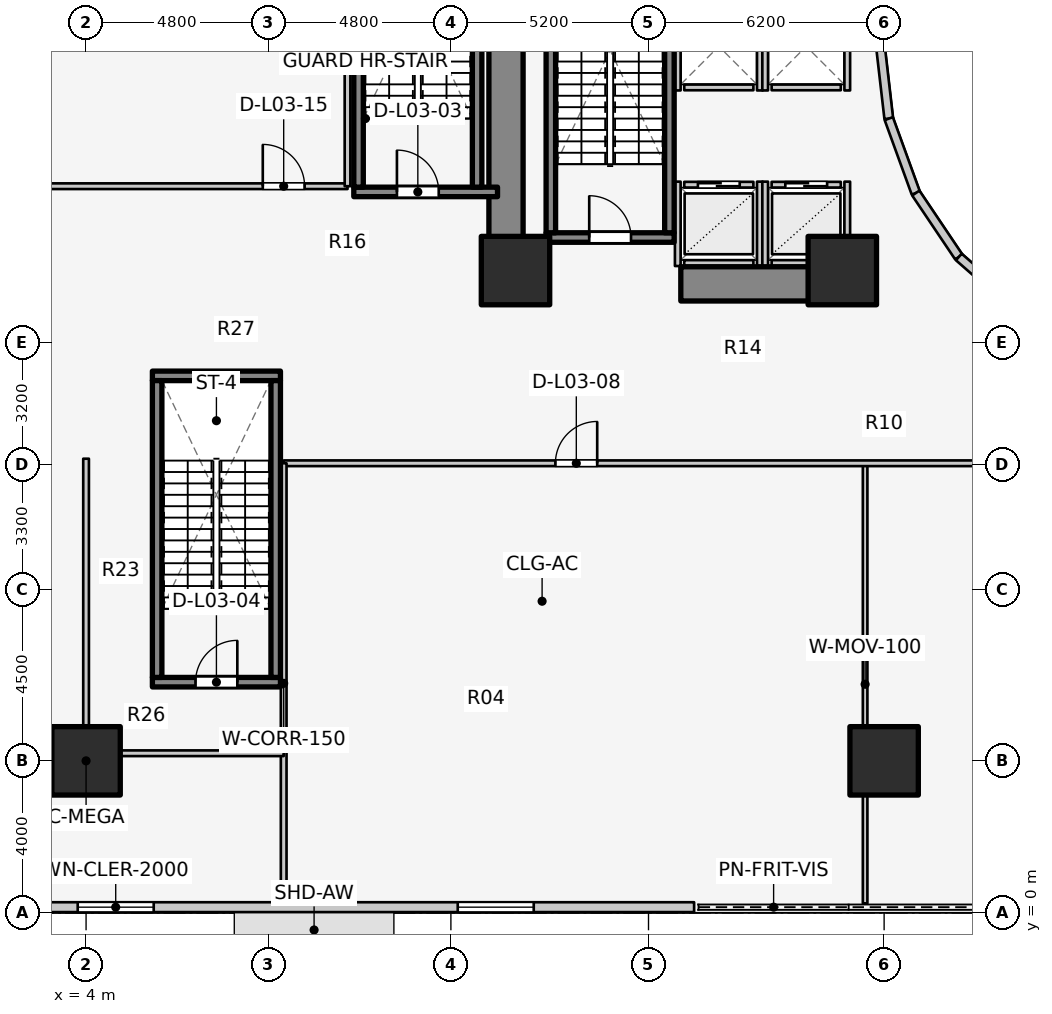
"""IFC4 building model, lengths in metres.
Left out: names, types, materials, properties, quantities, classifications, styles, units other than length and angle.
Written with IfcOpenShell. Run it as: python <this file> out.ifc"""

import sys

from ifc_helpers import new_model, si_unit, direction, frame, frame_2d, origin, origin_2d, place, context, subcontext, project, spatial, rectangle, extrude, element, fill, save


model = new_model("IFC4")
c1 = context("Model", 3, precision=1e-05, world=origin(), true_north=direction((0.0, 1.0)))
c2 = subcontext(c1, "Body", "Model", "MODEL_VIEW")
j1 = project(units=[si_unit("LENGTHUNIT", "METRE"), si_unit("PLANEANGLEUNIT", "RADIAN")], contexts=[c1])
p1 = place(None, origin())
s1 = spatial("IfcSite", under=j1, at=p1, CompositionType="ELEMENT")
p2 = place(p1, origin())
s2 = spatial("IfcBuilding", under=s1, at=p2, CompositionType="ELEMENT")
p3 = place(p2, frame((0.0, 0.0, 9.2)))
s3 = spatial("IfcBuildingStorey", under=s2, at=p3, CompositionType="ELEMENT", Elevation=9.2)
p4 = place(p3, frame((15.05, 17.05, 0.0), z_axis=(0.0, 0.0, 1.0), x_axis=(0.0, 1.0, 0.0)))
e1 = element("IfcWall", 1, at=p4, inside=s3, PredefinedType="SHEAR", context=c2, shape_type="SweptSolid", body=[
    extrude(rectangle(XDim=12.8, YDim=0.9, at=frame_2d((6.4, 0.0))), origin(), (0.0, 0.0, 1.0), 4.6),
])
p5 = place(p3, frame((19.65, 16.55, 0.0), z_axis=(0.0, 0.0, 1.0), x_axis=(1.0, 0.0, 0.0)))
e2 = element("IfcWall", 2, at=p5, inside=s3, PredefinedType="SHEAR", context=c2, shape_type="SweptSolid", body=[
    extrude(rectangle(XDim=4.5, YDim=0.9, at=frame_2d((2.25, 0.0))), origin(), (0.0, 0.0, 1.0), 4.6),
])
p6 = place(p3, frame((16.105, 17.77, 0.0), z_axis=(0.0, 0.0, 1.0), x_axis=(1.0, 0.0, 0.0)))
e3 = element("IfcWall", 3, at=p6, inside=s3, PredefinedType="SOLIDWALL", context=c2, shape_type="SweptSolid", body=[
    extrude(rectangle(XDim=3.37, YDim=0.25, at=frame_2d((1.685, 0.0))), origin(), (0.0, 0.0, 1.0), 4.6),
])
p7 = place(p6, frame((1.135, 0.0, 0.0)))
e4 = element("IfcOpeningElement", 4, at=p7, cuts=e3, PredefinedType="OPENING", context=c2, shape_type="SweptSolid", body=[
    extrude(rectangle(XDim=1.1, YDim=2.1, at=frame_2d((0.55, 1.05))), frame((0.0, 0.135, 0.0), z_axis=(0.0, -1.0, 0.0), x_axis=(1.0, 0.0, 0.0)), (0.0, 0.0, 1.0), 0.27),
])
for number, where, z_axis, x_axis in (
    (5, (16.23, 17.895, 0.0), (0.0, 0.0, 1.0), (0.0, 1.0, 0.0)),
    (6, (19.35, 17.895, 0.0), (0.0, 0.0, 1.0), (0.0, 1.0, 0.0)),
):
    element("IfcWall", number, at=place(p3, frame(where, z_axis=z_axis, x_axis=x_axis)), inside=s3, PredefinedType="SOLIDWALL", context=c2, shape_type="SweptSolid", body=[
        extrude(rectangle(XDim=7.81, YDim=0.25, at=frame_2d((3.905, 0.0))), origin(), (0.0, 0.0, 1.0), 4.6),
    ])
p8 = place(p3, frame((11.045, 18.97, 0.0), z_axis=(0.0, 0.0, 1.0), x_axis=(1.0, 0.0, 0.0)))
e7 = element("IfcWall", 7, at=p8, inside=s3, PredefinedType="SOLIDWALL", context=c2, shape_type="SweptSolid", body=[
    extrude(rectangle(XDim=3.782, YDim=0.25, at=frame_2d((1.891, 0.0))), origin(), (0.0, 0.0, 1.0), 4.6),
])
p9 = place(p8, frame((1.135, 0.0, 0.0)))
e8 = element("IfcOpeningElement", 8, at=p9, cuts=e7, PredefinedType="OPENING", context=c2, shape_type="SweptSolid", body=[
    extrude(rectangle(XDim=1.1, YDim=2.1, at=frame_2d((0.55, 1.05))), frame((0.0, 0.135, 0.0), z_axis=(0.0, -1.0, 0.0), x_axis=(1.0, 0.0, 0.0)), (0.0, 0.0, 1.0), 0.27),
])
for number, where, z_axis, x_axis in (
    (9, (11.17, 19.095, 0.0), (0.0, 0.0, 1.0), (0.0, 1.0, 0.0)),
    (10, (14.29, 19.095, 0.0), (0.0, 0.0, 1.0), (0.0, 1.0, 0.0)),
):
    element("IfcWall", number, at=place(p3, frame(where, z_axis=z_axis, x_axis=x_axis)), inside=s3, PredefinedType="SOLIDWALL", context=c2, shape_type="SweptSolid", body=[
        extrude(rectangle(XDim=7.81, YDim=0.25, at=frame_2d((3.905, 0.0))), origin(), (0.0, 0.0, 1.0), 4.6),
    ])
p10 = place(p3, frame((5.745, 6.07, 0.0), z_axis=(0.0, 0.0, 1.0), x_axis=(1.0, 0.0, 0.0)))
e11 = element("IfcWall", 11, at=p10, inside=s3, PredefinedType="SOLIDWALL", context=c2, shape_type="SweptSolid", body=[
    extrude(rectangle(XDim=3.37, YDim=0.25, at=frame_2d((1.685, 0.0))), origin(), (0.0, 0.0, 1.0), 4.6),
])
p11 = place(p10, frame((1.135, 0.0, 0.0)))
e12 = element("IfcOpeningElement", 12, at=p11, cuts=e11, PredefinedType="OPENING", context=c2, shape_type="SweptSolid", body=[
    extrude(rectangle(XDim=1.1, YDim=2.1, at=frame_2d((0.55, 1.05))), frame((0.0, 0.135, 0.0), z_axis=(0.0, -1.0, 0.0), x_axis=(1.0, 0.0, 0.0)), (0.0, 0.0, 1.0), 0.27),
])
p12 = place(p3, frame((5.745, 14.13, 0.0), z_axis=(0.0, 0.0, 1.0), x_axis=(1.0, 0.0, 0.0)))
e13 = element("IfcWall", 13, at=p12, inside=s3, PredefinedType="SOLIDWALL", context=c2, shape_type="SweptSolid", body=[
    extrude(rectangle(XDim=3.37, YDim=0.25, at=frame_2d((1.685, 0.0))), origin(), (0.0, 0.0, 1.0), 4.6),
])
for number, where, z_axis, x_axis in (
    (14, (5.87, 6.195, 0.0), (0.0, 0.0, 1.0), (0.0, 1.0, 0.0)),
    (15, (8.99, 6.195, 0.0), (0.0, 0.0, 1.0), (0.0, 1.0, 0.0)),
):
    element("IfcWall", number, at=place(p3, frame(where, z_axis=z_axis, x_axis=x_axis)), inside=s3, PredefinedType="SOLIDWALL", context=c2, shape_type="SweptSolid", body=[
        extrude(rectangle(XDim=7.81, YDim=0.25, at=frame_2d((3.905, 0.0))), origin(), (0.0, 0.0, 1.0), 4.6),
    ])
for number, where, z_axis, x_axis in (
    (16, (15.3, 16.9, 0.0), (0.0, 0.0, 1.0), (1.0, 0.0, 0.0)),
    (17, (23.9, 16.9, 0.0), (0.0, 0.0, 1.0), (1.0, 0.0, 0.0)),
    (18, (4.0, 4.0, 0.0), (0.0, 0.0, 1.0), (1.0, 0.0, 0.0)),
    (19, (25.0, 4.0, 0.0), (0.0, 0.0, 1.0), (1.0, 0.0, 0.0)),
):
    element("IfcColumn", number, at=place(p3, frame(where, z_axis=z_axis, x_axis=x_axis)), inside=s3, PredefinedType="COLUMN", context=c2, shape_type="SweptSolid", body=[
        extrude(rectangle(XDim=1.8, YDim=1.8, at=origin_2d()), origin(), (0.0, 0.0, 1.0), 4.6),
    ])
p13 = place(p3, frame((0.28, 0.15, 0.0), z_axis=(0.0, 0.0, 1.0), x_axis=(1.0, 0.0, 0.0)))
e20 = element("IfcWall", 20, at=p13, inside=s3, PredefinedType="STANDARD", context=c2, shape_type="SweptSolid", body=[
    extrude(rectangle(XDim=19.72, YDim=0.26, at=frame_2d((9.86, 0.0))), origin(), (0.0, 0.0, 1.0), 4.28),
])
p14 = place(p13, frame((3.5, 0.0, 2.2)))
e21 = element("IfcOpeningElement", 21, at=p14, cuts=e20, PredefinedType="OPENING", context=c2, shape_type="SweptSolid", body=[
    extrude(rectangle(XDim=2.0, YDim=1.1, at=frame_2d((1.0, 0.55))), frame((0.0, 0.14, 0.0), z_axis=(0.0, -1.0, 0.0), x_axis=(1.0, 0.0, 0.0)), (0.0, 0.0, 1.0), 0.28),
])
p15 = place(p13, frame((13.5, 0.0, 2.2)))
e22 = element("IfcOpeningElement", 22, at=p15, cuts=e20, PredefinedType="OPENING", context=c2, shape_type="SweptSolid", body=[
    extrude(rectangle(XDim=2.0, YDim=1.1, at=frame_2d((1.0, 0.55))), frame((0.0, 0.14, 0.0), z_axis=(0.0, -1.0, 0.0), x_axis=(1.0, 0.0, 0.0)), (0.0, 0.0, 1.0), 0.28),
])
p16 = place(p3, frame((24.88, 23.0, 0.0), z_axis=(0.0, 0.0, 1.0), x_axis=(0.114711713601, -0.993398823617, 0.0)))
e23 = element("IfcWall", 23, at=p16, inside=s3, PredefinedType="STANDARD", context=c2, shape_type="SweptSolid", body=[
    extrude(rectangle(XDim=2.115, YDim=0.23, at=frame_2d((1.058, 0.0))), origin(), (0.0, 0.0, 1.0), 3.28),
])
p17 = place(p3, frame((25.123, 20.898, 0.0), z_axis=(0.0, 0.0, 1.0), x_axis=(0.341423187295, -0.93990968033, 0.0)))
e24 = element("IfcWall", 24, at=p17, inside=s3, PredefinedType="STANDARD", context=c2, shape_type="SweptSolid", body=[
    extrude(rectangle(XDim=2.084, YDim=0.23, at=frame_2d((1.042, 0.0))), origin(), (0.0, 0.0, 1.0), 3.28),
])
p18 = place(p3, frame((25.834, 18.94, 0.0), z_axis=(0.0, 0.0, 1.0), x_axis=(0.558197800898, -0.829707909492, 0.0)))
e25 = element("IfcWall", 25, at=p18, inside=s3, PredefinedType="STANDARD", context=c2, shape_type="SweptSolid", body=[
    extrude(rectangle(XDim=2.027, YDim=0.23, at=frame_2d((1.013, 0.0))), origin(), (0.0, 0.0, 1.0), 3.28),
])
p19 = place(p3, frame((26.965, 17.258, 0.0), z_axis=(0.0, 0.0, 1.0), x_axis=(0.752576694707, -0.658504607869, 0.0)))
e26 = element("IfcWall", 26, at=p19, inside=s3, PredefinedType="STANDARD", context=c2, shape_type="SweptSolid", body=[
    extrude(rectangle(XDim=1.959, YDim=0.23, at=frame_2d((0.98, 0.0))), origin(), (0.0, 0.0, 1.0), 3.28),
])
p20 = place(p3, frame((19.74, 19.16, 0.0), z_axis=(0.0, 0.0, 1.0), x_axis=(1.0, 0.0, 0.0)))
e27 = element("IfcWall", 27, at=p20, inside=s3, PredefinedType="SOLIDWALL", context=c2, shape_type="SweptSolid", body=[
    extrude(rectangle(XDim=1.82, YDim=0.15, at=frame_2d((0.91, 0.0))), origin(), (0.0, 0.0, 1.0), 4.255),
])
p21 = place(p20, frame((0.36, 0.0, 0.0)))
e28 = element("IfcOpeningElement", 28, at=p21, cuts=e27, PredefinedType="OPENING", context=c2, shape_type="SweptSolid", body=[
    extrude(rectangle(XDim=1.1, YDim=2.1, at=frame_2d((0.55, 1.05))), frame((0.0, 0.085, 0.0), z_axis=(0.0, -1.0, 0.0), x_axis=(1.0, 0.0, 0.0)), (0.0, 0.0, 1.0), 0.17),
])
p22 = place(p3, frame((19.74, 17.1, 0.0), z_axis=(0.0, 0.0, 1.0), x_axis=(1.0, 0.0, 0.0)))
e29 = element("IfcWall", 29, at=p22, inside=s3, PredefinedType="SOLIDWALL", context=c2, shape_type="SweptSolid", body=[
    extrude(rectangle(XDim=1.82, YDim=0.15, at=frame_2d((0.91, 0.0))), origin(), (0.0, 0.0, 1.0), 4.255),
])
p23 = place(p3, frame((19.57, 17.02, 0.0), z_axis=(0.0, 0.0, 1.0), x_axis=(0.0, 1.0, 0.0)))
e30 = element("IfcWall", 30, at=p23, inside=s3, PredefinedType="SOLIDWALL", context=c2, shape_type="SweptSolid", body=[
    extrude(rectangle(XDim=2.22, YDim=0.15, at=frame_2d((1.11, 0.0))), origin(), (0.0, 0.0, 1.0), 3.62),
])
p24 = place(p3, frame((21.73, 17.02, 0.0), z_axis=(0.0, 0.0, 1.0), x_axis=(0.0, 1.0, 0.0)))
e31 = element("IfcWall", 31, at=p24, inside=s3, PredefinedType="SOLIDWALL", context=c2, shape_type="SweptSolid", body=[
    extrude(rectangle(XDim=2.22, YDim=0.15, at=frame_2d((1.11, 0.0))), origin(), (0.0, 0.0, 1.0), 4.255),
])
p25 = place(p3, frame((22.04, 19.16, 0.0), z_axis=(0.0, 0.0, 1.0), x_axis=(1.0, 0.0, 0.0)))
e32 = element("IfcWall", 32, at=p25, inside=s3, PredefinedType="SOLIDWALL", context=c2, shape_type="SweptSolid", body=[
    extrude(rectangle(XDim=1.82, YDim=0.15, at=frame_2d((0.91, 0.0))), origin(), (0.0, 0.0, 1.0), 3.62),
])
p26 = place(p25, frame((0.36, 0.0, 0.0)))
e33 = element("IfcOpeningElement", 33, at=p26, cuts=e32, PredefinedType="OPENING", context=c2, shape_type="SweptSolid", body=[
    extrude(rectangle(XDim=1.1, YDim=2.1, at=frame_2d((0.55, 1.05))), frame((0.0, 0.085, 0.0), z_axis=(0.0, -1.0, 0.0), x_axis=(1.0, 0.0, 0.0)), (0.0, 0.0, 1.0), 0.17),
])
p27 = place(p3, frame((22.04, 17.1, 0.0), z_axis=(0.0, 0.0, 1.0), x_axis=(1.0, 0.0, 0.0)))
e34 = element("IfcWall", 34, at=p27, inside=s3, PredefinedType="SOLIDWALL", context=c2, shape_type="SweptSolid", body=[
    extrude(rectangle(XDim=1.82, YDim=0.15, at=frame_2d((0.91, 0.0))), origin(), (0.0, 0.0, 1.0), 3.62),
])
p28 = place(p3, frame((21.87, 17.02, 0.0), z_axis=(0.0, 0.0, 1.0), x_axis=(0.0, 1.0, 0.0)))
e35 = element("IfcWall", 35, at=p28, inside=s3, PredefinedType="SOLIDWALL", context=c2, shape_type="SweptSolid", body=[
    extrude(rectangle(XDim=2.22, YDim=0.15, at=frame_2d((1.11, 0.0))), origin(), (0.0, 0.0, 1.0), 4.255),
])
p29 = place(p3, frame((24.03, 17.02, 0.0), z_axis=(0.0, 0.0, 1.0), x_axis=(0.0, 1.0, 0.0)))
e36 = element("IfcWall", 36, at=p29, inside=s3, PredefinedType="SOLIDWALL", context=c2, shape_type="SweptSolid", body=[
    extrude(rectangle(XDim=2.22, YDim=0.15, at=frame_2d((1.11, 0.0))), origin(), (0.0, 0.0, 1.0), 3.3),
])
p30 = place(p3, frame((19.74, 21.72, 0.0), z_axis=(0.0, 0.0, 1.0), x_axis=(1.0, 0.0, 0.0)))
e37 = element("IfcWall", 37, at=p30, inside=s3, PredefinedType="SOLIDWALL", context=c2, shape_type="SweptSolid", body=[
    extrude(rectangle(XDim=1.82, YDim=0.15, at=frame_2d((0.91, 0.0))), origin(), (0.0, 0.0, 1.0), 4.255),
])
for number, where, z_axis, x_axis in (
    (38, (19.57, 21.64, 0.0), (0.0, 0.0, 1.0), (0.0, 1.0, 0.0)),
    (39, (21.73, 21.64, 0.0), (0.0, 0.0, 1.0), (0.0, 1.0, 0.0)),
):
    element("IfcWall", number, at=place(p3, frame(where, z_axis=z_axis, x_axis=x_axis)), inside=s3, PredefinedType="SOLIDWALL", context=c2, shape_type="SweptSolid", body=[
        extrude(rectangle(XDim=2.32, YDim=0.15, at=frame_2d((1.16, 0.0))), origin(), (0.0, 0.0, 1.0), 4.255),
    ])
p31 = place(p3, frame((22.04, 21.72, 0.0), z_axis=(0.0, 0.0, 1.0), x_axis=(1.0, 0.0, 0.0)))
e40 = element("IfcWall", 40, at=p31, inside=s3, PredefinedType="SOLIDWALL", context=c2, shape_type="SweptSolid", body=[
    extrude(rectangle(XDim=1.82, YDim=0.15, at=frame_2d((0.91, 0.0))), origin(), (0.0, 0.0, 1.0), 3.62),
])
p32 = place(p3, frame((21.87, 21.64, 0.0), z_axis=(0.0, 0.0, 1.0), x_axis=(0.0, 1.0, 0.0)))
e41 = element("IfcWall", 41, at=p32, inside=s3, PredefinedType="SOLIDWALL", context=c2, shape_type="SweptSolid", body=[
    extrude(rectangle(XDim=2.32, YDim=0.15, at=frame_2d((1.16, 0.0))), origin(), (0.0, 0.0, 1.0), 4.255),
])
p33 = place(p3, frame((24.03, 21.64, 0.0), z_axis=(0.0, 0.0, 1.0), x_axis=(0.0, 1.0, 0.0)))
e42 = element("IfcWall", 42, at=p33, inside=s3, PredefinedType="SOLIDWALL", context=c2, shape_type="SweptSolid", body=[
    extrude(rectangle(XDim=2.32, YDim=0.15, at=frame_2d((1.16, 0.0))), origin(), (0.0, 0.0, 1.0), 3.62),
])
p34 = place(p3, frame((24.5, 0.25, 0.0), z_axis=(0.0, 0.0, 1.0), x_axis=(0.0, 1.0, 0.0)))
e43 = element("IfcWall", 43, at=p34, inside=s3, PredefinedType="MOVABLE", context=c2, shape_type="SweptSolid", body=[
    extrude(rectangle(XDim=11.53, YDim=0.12, at=frame_2d((5.765, 0.0))), origin(), (0.0, 0.0, 1.0), 3.3),
])
p35 = place(p3, frame((9.2, 11.83, 0.0), z_axis=(0.0, 0.0, 1.0), x_axis=(1.0, 0.0, 0.0)))
e44 = element("IfcWall", 44, at=p35, inside=s3, PredefinedType="PARTITIONING", context=c2, shape_type="SweptSolid", body=[
    extrude(rectangle(XDim=45.6, YDim=0.15, at=frame_2d((22.8, 0.0))), origin(), (0.0, 0.0, 1.0), 3.3),
])
p36 = place(p35, frame((7.15, 0.0, 0.0)))
e45 = element("IfcOpeningElement", 45, at=p36, cuts=e44, PredefinedType="OPENING", context=c2, shape_type="SweptSolid", body=[
    extrude(rectangle(XDim=1.1, YDim=2.1, at=frame_2d((0.55, 1.05))), frame((0.0, 0.085, 0.0), z_axis=(0.0, -1.0, 0.0), x_axis=(1.0, 0.0, 0.0)), (0.0, 0.0, 1.0), 0.17),
])
p37 = place(p35, frame((23.35, 0.0, 0.0)))
e46 = element("IfcOpeningElement", 46, at=p37, cuts=e44, PredefinedType="OPENING", context=c2, shape_type="SweptSolid", body=[
    extrude(rectangle(XDim=1.1, YDim=2.1, at=frame_2d((0.55, 1.05))), frame((0.0, 0.085, 0.0), z_axis=(0.0, -1.0, 0.0), x_axis=(1.0, 0.0, 0.0)), (0.0, 0.0, 1.0), 0.17),
])
p38 = place(p35, frame((38.45, 0.0, 0.0)))
e47 = element("IfcOpeningElement", 47, at=p38, cuts=e44, PredefinedType="OPENING", context=c2, shape_type="SweptSolid", body=[
    extrude(rectangle(XDim=1.1, YDim=2.1, at=frame_2d((0.55, 1.05))), frame((0.0, 0.085, 0.0), z_axis=(0.0, -1.0, 0.0), x_axis=(1.0, 0.0, 0.0)), (0.0, 0.0, 1.0), 0.17),
])
p39 = place(p3, frame((9.2, 0.25, 0.0), z_axis=(0.0, 0.0, 1.0), x_axis=(0.0, 1.0, 0.0)))
e48 = element("IfcWall", 48, at=p39, inside=s3, PredefinedType="PARTITIONING", context=c2, shape_type="SweptSolid", body=[
    extrude(rectangle(XDim=11.58, YDim=0.15, at=frame_2d((5.79, 0.0))), origin(), (0.0, 0.0, 1.0), 3.3),
])
p40 = place(p3, frame((4.0, 4.2, 0.0), z_axis=(0.0, 0.0, 1.0), x_axis=(0.0, 1.0, 0.0)))
e49 = element("IfcWall", 49, at=p40, inside=s3, PredefinedType="PARTITIONING", context=c2, shape_type="SweptSolid", body=[
    extrude(rectangle(XDim=7.75, YDim=0.15, at=frame_2d((3.875, 0.0))), origin(), (0.0, 0.0, 1.0), 3.3),
])
p41 = place(p3, frame((4.0, 4.2, 0.0), z_axis=(0.0, 0.0, 1.0), x_axis=(1.0, 0.0, 0.0)))
e50 = element("IfcWall", 50, at=p41, inside=s3, PredefinedType="PARTITIONING", context=c2, shape_type="SweptSolid", body=[
    extrude(rectangle(XDim=5.2, YDim=0.15, at=frame_2d((2.6, 0.0))), origin(), (0.0, 0.0, 1.0), 3.3),
])
p42 = place(p3, frame((0.25, 19.12, 0.0), z_axis=(0.0, 0.0, 1.0), x_axis=(1.0, 0.0, 0.0)))
e51 = element("IfcWall", 51, at=p42, inside=s3, PredefinedType="PARTITIONING", context=c2, shape_type="SweptSolid", body=[
    extrude(rectangle(XDim=10.63, YDim=0.15, at=frame_2d((5.315, 0.0))), origin(), (0.0, 0.0, 1.0), 3.3),
])
p43 = place(p42, frame((8.4, 0.0, 0.0)))
e52 = element("IfcOpeningElement", 52, at=p43, cuts=e51, PredefinedType="OPENING", context=c2, shape_type="SweptSolid", body=[
    extrude(rectangle(XDim=1.1, YDim=2.1, at=frame_2d((0.55, 1.05))), frame((0.0, 0.085, 0.0), z_axis=(0.0, -1.0, 0.0), x_axis=(1.0, 0.0, 0.0)), (0.0, 0.0, 1.0), 0.17),
])
p44 = place(p3, frame((10.88, 19.12, 0.0), z_axis=(0.0, 0.0, 1.0), x_axis=(0.0, 1.0, 0.0)))
e53 = element("IfcWall", 53, at=p44, inside=s3, PredefinedType="PARTITIONING", context=c2, shape_type="SweptSolid", body=[
    extrude(rectangle(XDim=11.08, YDim=0.15, at=frame_2d((5.54, 0.0))), origin(), (0.0, 0.0, 1.0), 3.62),
])
p45 = place(p14, origin())
e54 = element("IfcWindow", 54, at=p45, inside=s3, PartitioningType="SINGLE_PANEL", PredefinedType="WINDOW", context=c2, shape_type="SweptSolid", body=[
    extrude(rectangle(XDim=2.0, YDim=1.1, at=frame_2d((1.0, 0.55))), frame((0.0, 0.03, 0.0), z_axis=(0.0, -1.0, 0.0), x_axis=(1.0, 0.0, 0.0)), (0.0, 0.0, 1.0), 0.06),
])
fill(e21, e54)
p46 = place(p15, origin())
e55 = element("IfcWindow", 55, at=p46, inside=s3, PartitioningType="SINGLE_PANEL", PredefinedType="WINDOW", context=c2, shape_type="SweptSolid", body=[
    extrude(rectangle(XDim=2.0, YDim=1.1, at=frame_2d((1.0, 0.55))), frame((0.0, 0.03, 0.0), z_axis=(0.0, -1.0, 0.0), x_axis=(1.0, 0.0, 0.0)), (0.0, 0.0, 1.0), 0.06),
])
fill(e22, e55)
p47 = place(p7, origin())
e56 = element("IfcDoor", 56, at=p47, inside=s3, OperationType="SINGLE_SWING_LEFT", PredefinedType="DOOR", context=c2, shape_type="SweptSolid", body=[
    extrude(rectangle(XDim=1.1, YDim=2.1, at=frame_2d((0.55, 1.05))), frame((0.0, 0.025, 0.0), z_axis=(0.0, -1.0, 0.0), x_axis=(1.0, 0.0, 0.0)), (0.0, 0.0, 1.0), 0.05),
])
fill(e4, e56)
p48 = place(p9, origin())
e57 = element("IfcDoor", 57, at=p48, inside=s3, OperationType="SINGLE_SWING_LEFT", PredefinedType="DOOR", context=c2, shape_type="SweptSolid", body=[
    extrude(rectangle(XDim=1.1, YDim=2.1, at=frame_2d((0.55, 1.05))), frame((0.0, 0.025, 0.0), z_axis=(0.0, -1.0, 0.0), x_axis=(1.0, 0.0, 0.0)), (0.0, 0.0, 1.0), 0.05),
])
fill(e8, e57)
p49 = place(p11, origin())
e58 = element("IfcDoor", 58, at=p49, inside=s3, OperationType="SINGLE_SWING_RIGHT", PredefinedType="DOOR", context=c2, shape_type="SweptSolid", body=[
    extrude(rectangle(XDim=1.1, YDim=2.1, at=frame_2d((0.55, 1.05))), frame((0.0, 0.025, 0.0), z_axis=(0.0, -1.0, 0.0), x_axis=(1.0, 0.0, 0.0)), (0.0, 0.0, 1.0), 0.05),
])
fill(e12, e58)
p50 = place(p21, origin())
e59 = element("IfcDoor", 59, at=p50, inside=s3, OperationType="DOUBLE_DOOR_SLIDING", PredefinedType="DOOR", context=c2, shape_type="SweptSolid", body=[
    extrude(rectangle(XDim=1.1, YDim=2.1, at=frame_2d((0.55, 1.05))), frame((0.0, 0.025, 0.0), z_axis=(0.0, -1.0, 0.0), x_axis=(1.0, 0.0, 0.0)), (0.0, 0.0, 1.0), 0.05),
])
fill(e28, e59)
p51 = place(p26, origin())
e60 = element("IfcDoor", 60, at=p51, inside=s3, OperationType="DOUBLE_DOOR_SLIDING", PredefinedType="DOOR", context=c2, shape_type="SweptSolid", body=[
    extrude(rectangle(XDim=1.1, YDim=2.1, at=frame_2d((0.55, 1.05))), frame((0.0, 0.025, 0.0), z_axis=(0.0, -1.0, 0.0), x_axis=(1.0, 0.0, 0.0)), (0.0, 0.0, 1.0), 0.05),
])
fill(e33, e60)
p52 = place(p36, origin())
e61 = element("IfcDoor", 61, at=p52, inside=s3, OperationType="SINGLE_SWING_RIGHT", PredefinedType="DOOR", context=c2, shape_type="SweptSolid", body=[
    extrude(rectangle(XDim=1.1, YDim=2.1, at=frame_2d((0.55, 1.05))), frame((0.0, 0.025, 0.0), z_axis=(0.0, -1.0, 0.0), x_axis=(1.0, 0.0, 0.0)), (0.0, 0.0, 1.0), 0.05),
])
fill(e45, e61)
p53 = place(p43, origin())
e62 = element("IfcDoor", 62, at=p53, inside=s3, OperationType="SINGLE_SWING_LEFT", PredefinedType="DOOR", context=c2, shape_type="SweptSolid", body=[
    extrude(rectangle(XDim=1.1, YDim=2.1, at=frame_2d((0.55, 1.05))), frame((0.0, 0.025, 0.0), z_axis=(0.0, -1.0, 0.0), x_axis=(1.0, 0.0, 0.0)), (0.0, 0.0, 1.0), 0.05),
])
fill(e52, e62)
save(model, sys.argv[1])
